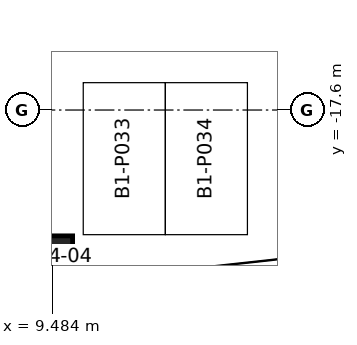
"""IFC4 building model, lengths in metres.
Left out: names, types, materials, properties, quantities, classifications, styles, units other than length and angle.
Written with IfcOpenShell. Run it as: python <this file> out.ifc"""

import sys

from ifc_helpers import new_model, si_unit, direction, frame, origin, origin_2d, place, context, subcontext, project, spatial, rectangle, extrude, element, save


model = new_model("IFC4")
c1 = context("Model", 3, precision=1e-05, world=origin(), true_north=direction((0.0, 1.0)))
c2 = subcontext(c1, "Body", "Model", "MODEL_VIEW")
j1 = project(units=[si_unit("LENGTHUNIT", "METRE"), si_unit("PLANEANGLEUNIT", "RADIAN")], contexts=[c1])
p1 = place(None, origin())
s1 = spatial("IfcSite", under=j1, at=p1, CompositionType="ELEMENT")
p2 = place(p1, origin())
s2 = spatial("IfcBuilding", under=s1, at=p2, CompositionType="ELEMENT")
p3 = place(p2, frame((0.0, 0.0, -4.5)))
s3 = spatial("IfcBuildingStorey", under=s2, at=p3, CompositionType="ELEMENT", Elevation=-4.5)
p4 = place(p3, frame((9.45, -22.439, 0.0), z_axis=(0.0, 0.0, 1.0), x_axis=(0.997839473817, 0.06569919705, 0.0)))
e1 = element("IfcColumn", 1, at=p4, inside=s3, PredefinedType="COLUMN", context=c2, shape_type="SweptSolid", body=[
    extrude(rectangle(XDim=1.4, YDim=1.4, at=origin_2d()), origin(), (0.0, 0.0, 1.0), 4.5),
])
save(model, sys.argv[1])
